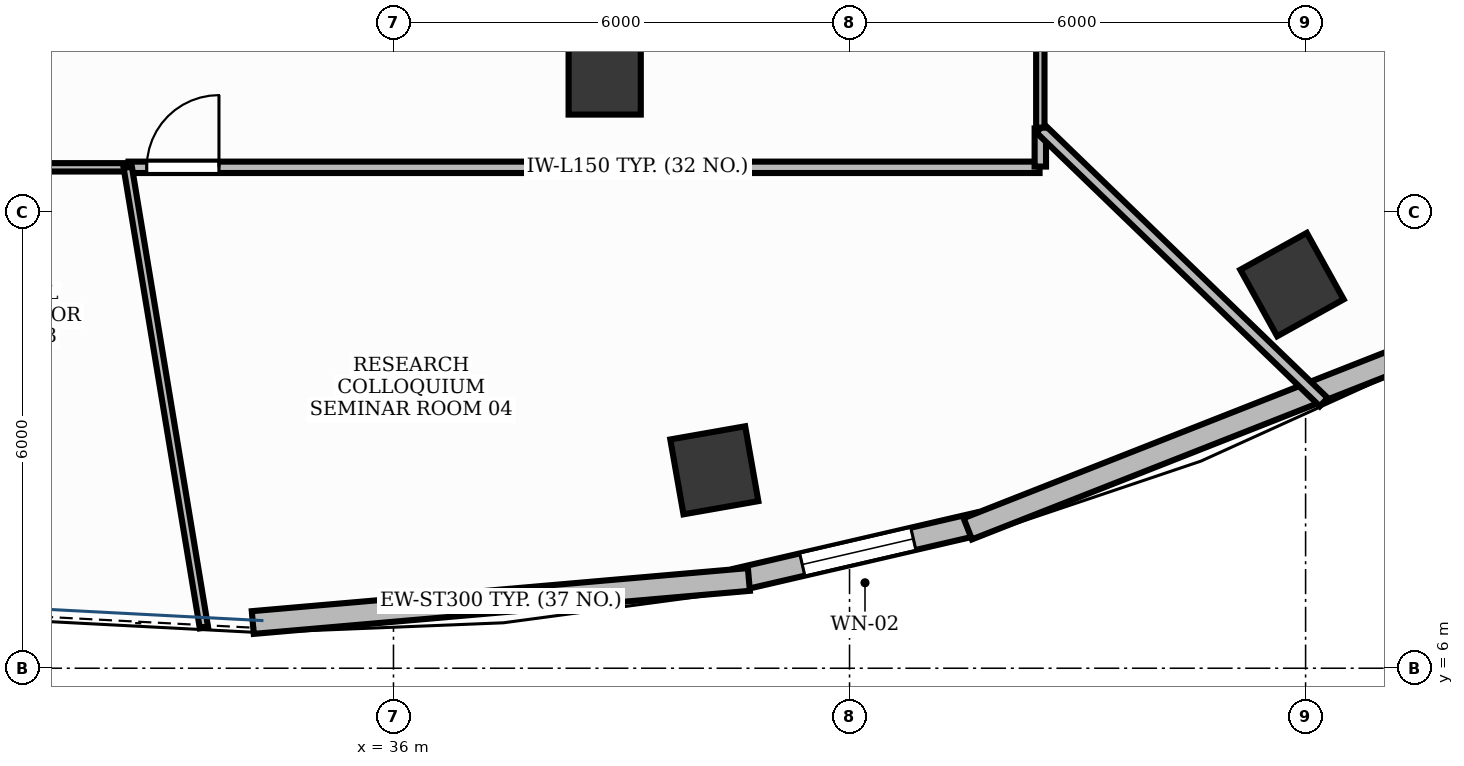
"""IFC4 building model, lengths in metres.
Left out: names, types, materials, properties, quantities, classifications, styles, units other than length and angle.
Written with IfcOpenShell. Run it as: python <this file> out.ifc"""

import sys

from ifc_helpers import new_model, si_unit, direction, frame, frame_2d, origin, origin_2d, place, context, subcontext, project, spatial, rectangle, extrude, element, fill, save


model = new_model("IFC4")
c1 = context("Model", 3, precision=1e-05, world=origin(), true_north=direction((0.0, 1.0)))
c2 = subcontext(c1, "Body", "Model", "MODEL_VIEW")
j1 = project(units=[si_unit("LENGTHUNIT", "METRE"), si_unit("PLANEANGLEUNIT", "RADIAN")], contexts=[c1])
p1 = place(None, origin())
s1 = spatial("IfcSite", under=j1, at=p1, CompositionType="ELEMENT")
p2 = place(p1, origin())
s2 = spatial("IfcBuilding", under=s1, at=p2, CompositionType="ELEMENT")
p3 = place(p2, frame((0.0, 0.0, 183.6)))
s3 = spatial("IfcBuildingStorey", under=s2, at=p3, CompositionType="ELEMENT", Elevation=183.6)
p4 = place(p3, frame((40.221, 8.604, -0.0), z_axis=(0.0, 0.0, 1.0), x_axis=(0.984868307662, 0.173304404339, 0.0)))
e1 = element("IfcColumn", 1, at=p4, inside=s3, PredefinedType="COLUMN", context=c2, shape_type="SweptSolid", body=[
    extrude(rectangle(XDim=1.0, YDim=1.0, at=origin_2d()), origin(), (0.0, 0.0, 1.0), 3.901),
])
p5 = place(p3, frame((38.779, 13.759, -0.0), z_axis=(0.0, 0.0, 1.0), x_axis=(1.0, 0.0, 0.0)))
e2 = element("IfcColumn", 2, at=p5, inside=s3, PredefinedType="COLUMN", context=c2, shape_type="SweptSolid", body=[
    extrude(rectangle(XDim=0.95, YDim=0.95, at=origin_2d()), origin(), (0.0, 0.0, 1.0), 3.901),
])
p6 = place(p3, frame((47.821, 11.047, -0.0), z_axis=(0.0, 0.0, 1.0), x_axis=(0.874535078577, 0.484962262797, 0.0)))
e3 = element("IfcColumn", 3, at=p6, inside=s3, PredefinedType="COLUMN", context=c2, shape_type="SweptSolid", body=[
    extrude(rectangle(XDim=1.0, YDim=1.0, at=origin_2d()), origin(), (0.0, 0.0, 1.0), 3.901),
])
p7 = place(p3, frame((40.514, 7.164, 0.0), z_axis=(0.0, 0.0, 1.0), x_axis=(0.974182179996, 0.225763327799, 0.0)))
e4 = element("IfcWall", 4, at=p7, inside=s3, PredefinedType="STANDARD", context=c2, shape_type="SweptSolid", body=[
    extrude(rectangle(XDim=3.274, YDim=0.3, at=frame_2d((1.637, 0.0))), origin(), (0.0, 0.0, 1.0), 3.9),
])
p8 = place(p7, frame((0.887, 0.0, 0.95)))
e5 = element("IfcOpeningElement", 5, at=p8, cuts=e4, PredefinedType="OPENING", context=c2, shape_type="SweptSolid", body=[
    extrude(rectangle(XDim=1.5, YDim=1.8, at=frame_2d((0.75, 0.9))), frame((0.0, 0.165, 0.0), z_axis=(0.0, -1.0, 0.0), x_axis=(1.0, 0.0, 0.0)), (0.0, 0.0, 1.0), 0.33),
])
p9 = place(p3, frame((34.149, 6.601, 0.0), z_axis=(0.0, 0.0, 1.0), x_axis=(0.996255675021, 0.086455942472, 0.0)))
e6 = element("IfcWall", 6, at=p9, inside=s3, PredefinedType="STANDARD", context=c2, shape_type="SweptSolid", body=[
    extrude(rectangle(XDim=6.551, YDim=0.3, at=frame_2d((3.276, 0.0))), origin(), (0.0, 0.0, 1.0), 3.9),
])
p10 = place(p3, frame((43.556, 7.835, 0.0), z_axis=(0.0, 0.0, 1.0), x_axis=(0.930552726132, 0.366157922062, 0.0)))
e7 = element("IfcWall", 7, at=p10, inside=s3, PredefinedType="STANDARD", context=c2, shape_type="SweptSolid", body=[
    extrude(rectangle(XDim=6.29, YDim=0.3, at=frame_2d((3.145, 0.0))), origin(), (0.0, 0.0, 1.0), 3.9),
])
p11 = place(p3, frame((19.85, 12.59, 0.0), z_axis=(0.0, 0.0, 1.0), x_axis=(1.0, 0.0, 0.0)))
e8 = element("IfcWall", 8, at=p11, inside=s3, PredefinedType="MOVABLE", context=c2, shape_type="SweptSolid", body=[
    extrude(rectangle(XDim=12.654, YDim=0.11, at=frame_2d((6.327, 0.0))), origin(), (0.0, 0.0, 1.0), 2.91),
])
p12 = place(p11, frame((4.994, 0.0, 0.0)))
e9 = element("IfcOpeningElement", 9, at=p12, cuts=e8, PredefinedType="OPENING", context=c2, shape_type="SweptSolid", body=[
    extrude(rectangle(XDim=0.95, YDim=2.15, at=frame_2d((0.475, 1.075))), frame((0.0, 0.07, 0.0), z_axis=(0.0, -1.0, 0.0), x_axis=(1.0, 0.0, 0.0)), (0.0, 0.0, 1.0), 0.14),
])
p13 = place(p3, frame((32.514, 12.59, 0.0), z_axis=(0.0, 0.0, 1.0), x_axis=(1.0, 0.0, 0.0)))
e10 = element("IfcWall", 10, at=p13, inside=s3, PredefinedType="PARTITIONING", context=c2, shape_type="SweptSolid", body=[
    extrude(rectangle(XDim=11.986, YDim=0.15, at=frame_2d((5.993, 0.0))), origin(), (0.0, 0.0, 1.0), 2.91),
])
p14 = place(p13, frame((0.24, 0.0, 0.0)))
e11 = element("IfcOpeningElement", 11, at=p14, cuts=e10, PredefinedType="OPENING", context=c2, shape_type="SweptSolid", body=[
    extrude(rectangle(XDim=0.95, YDim=2.15, at=frame_2d((0.475, 1.075))), frame((0.0, 0.09, 0.0), z_axis=(0.0, -1.0, 0.0), x_axis=(1.0, 0.0, 0.0)), (0.0, 0.0, 1.0), 0.18),
])
p15 = place(p3, frame((32.504, 12.59, 0.0), z_axis=(0.0, 0.0, 1.0), x_axis=(0.163321963264, -0.986572823625, 0.0)))
e12 = element("IfcWall", 12, at=p15, inside=s3, PredefinedType="MOVABLE", context=c2, shape_type="SweptSolid", body=[
    extrude(rectangle(XDim=6.139, YDim=0.11, at=frame_2d((3.07, 0.0))), origin(), (0.0, 0.0, 1.0), 2.91),
])
p16 = place(p3, frame((44.51, 12.6, 0.0), z_axis=(0.0, 0.0, 1.0), x_axis=(0.0, 1.0, 0.0)))
e13 = element("IfcWall", 13, at=p16, inside=s3, PredefinedType="PARTITIONING", context=c2, shape_type="SweptSolid", body=[
    extrude(rectangle(XDim=0.501, YDim=0.15, at=frame_2d((0.25, 0.0))), origin(), (0.0, 0.0, 1.0), 2.91),
])
p17 = place(p3, frame((44.51, 13.101, 0.0), z_axis=(0.0, 0.0, 1.0), x_axis=(0.719339776069, -0.694658395591, 0.0)))
e14 = element("IfcWall", 14, at=p17, inside=s3, PredefinedType="PARTITIONING", context=c2, shape_type="SweptSolid", body=[
    extrude(rectangle(XDim=5.183, YDim=0.15, at=frame_2d((2.592, 0.0))), origin(), (0.0, 0.0, 1.0), 2.91),
])
p18 = place(p3, frame((44.51, 13.111, 0.0), z_axis=(0.0, 0.0, 1.0), x_axis=(0.0, 1.0, 0.0)))
e15 = element("IfcWall", 15, at=p18, inside=s3, PredefinedType="MOVABLE", context=c2, shape_type="SweptSolid", body=[
    extrude(rectangle(XDim=3.289, YDim=0.11, at=frame_2d((1.644, 0.0))), origin(), (0.0, 0.0, 1.0), 2.91),
])
p19 = place(p8, origin())
e16 = element("IfcWindow", 16, at=p19, inside=s3, PartitioningType="DOUBLE_PANEL_VERTICAL", PredefinedType="WINDOW", context=c2, shape_type="SweptSolid", body=[
    extrude(rectangle(XDim=1.5, YDim=1.8, at=frame_2d((0.75, 0.9))), frame((0.0, 0.03, 0.0), z_axis=(0.0, -1.0, 0.0), x_axis=(1.0, 0.0, 0.0)), (0.0, 0.0, 1.0), 0.06),
])
fill(e5, e16)
p20 = place(p14, origin())
e17 = element("IfcDoor", 17, at=p20, inside=s3, OperationType="SINGLE_SWING_RIGHT", PredefinedType="DOOR", context=c2, shape_type="SweptSolid", body=[
    extrude(rectangle(XDim=0.95, YDim=2.15, at=frame_2d((0.475, 1.075))), frame((0.0, 0.025, 0.0), z_axis=(0.0, -1.0, 0.0), x_axis=(1.0, 0.0, 0.0)), (0.0, 0.0, 1.0), 0.05),
])
fill(e11, e17)
save(model, sys.argv[1])
